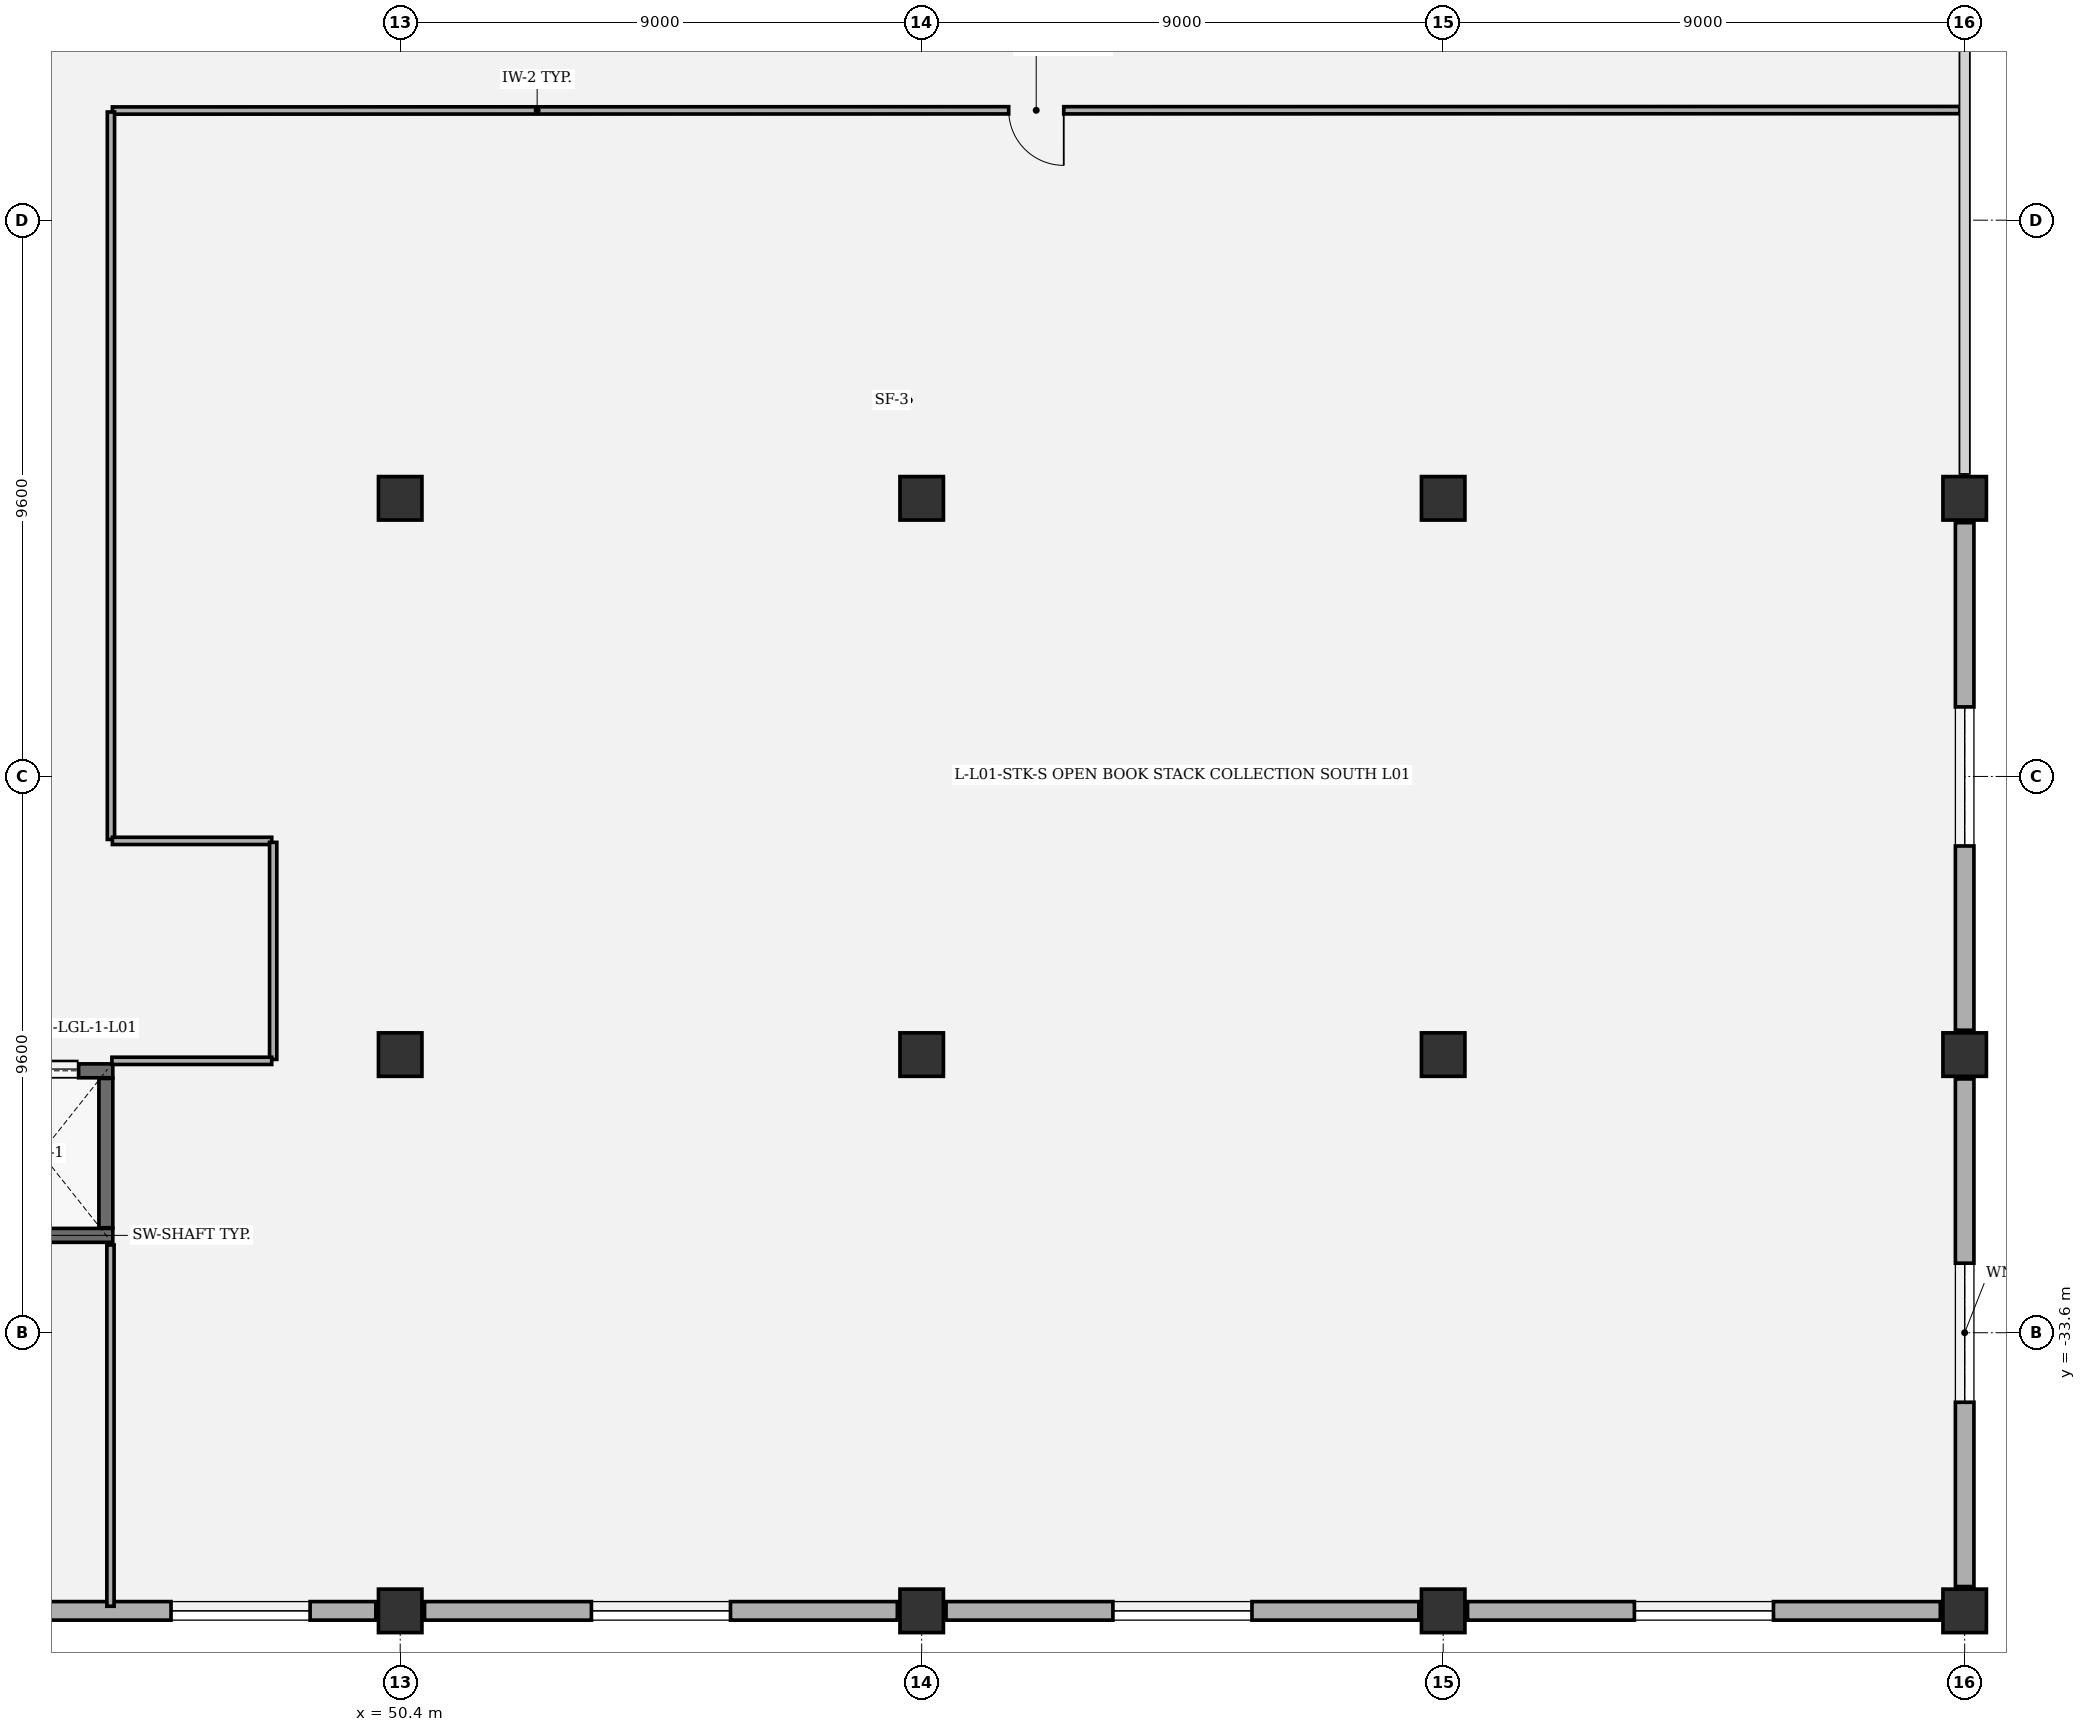
"""IFC4 building model, lengths in metres.
Left out: names, types, materials, properties, quantities, classifications, styles, units other than length and angle.
Written with IfcOpenShell. Run it as: python <this file> out.ifc"""

import sys

from ifc_helpers import new_model, si_unit, direction, frame, frame_2d, origin, origin_2d, place, context, subcontext, project, spatial, rectangle, extrude, element, fill, save


model = new_model("IFC4")
c1 = context("Model", 3, precision=1e-05, world=origin(), true_north=direction((0.0, 1.0)))
c2 = subcontext(c1, "Body", "Model", "MODEL_VIEW")
j1 = project(units=[si_unit("LENGTHUNIT", "METRE"), si_unit("PLANEANGLEUNIT", "RADIAN")], contexts=[c1])
p1 = place(None, origin())
s1 = spatial("IfcSite", under=j1, at=p1, CompositionType="ELEMENT")
p2 = place(p1, origin())
s2 = spatial("IfcBuilding", under=s1, at=p2, CompositionType="ELEMENT")
p3 = place(p2, frame((0.0, 0.0, 6.6)))
s3 = spatial("IfcBuildingStorey", under=s2, at=p3, CompositionType="ELEMENT", Elevation=6.6)
for number, where, z_axis, x_axis in (
    (1, (50.4, -38.4, 0.0), (0.0, 0.0, 1.0), (1.0, 0.0, 0.0)),
    (2, (50.4, -28.8, 0.0), (0.0, 0.0, 1.0), (1.0, 0.0, 0.0)),
    (3, (50.4, -19.2, 0.0), (0.0, 0.0, 1.0), (1.0, 0.0, 0.0)),
    (4, (59.4, -38.4, 0.0), (0.0, 0.0, 1.0), (1.0, 0.0, 0.0)),
    (5, (59.4, -28.8, 0.0), (0.0, 0.0, 1.0), (1.0, 0.0, 0.0)),
    (6, (59.4, -19.2, 0.0), (0.0, 0.0, 1.0), (1.0, 0.0, 0.0)),
    (7, (68.4, -38.4, 0.0), (0.0, 0.0, 1.0), (1.0, 0.0, 0.0)),
    (8, (68.4, -28.8, 0.0), (0.0, 0.0, 1.0), (1.0, 0.0, 0.0)),
    (9, (68.4, -19.2, 0.0), (0.0, 0.0, 1.0), (1.0, 0.0, 0.0)),
    (10, (77.4, -38.4, 0.0), (0.0, 0.0, 1.0), (1.0, 0.0, 0.0)),
    (11, (77.4, -28.8, 0.0), (0.0, 0.0, 1.0), (1.0, 0.0, 0.0)),
    (12, (77.4, -19.2, 0.0), (0.0, 0.0, 1.0), (1.0, 0.0, 0.0)),
):
    element("IfcColumn", number, at=place(p3, frame(where, z_axis=z_axis, x_axis=x_axis)), inside=s3, PredefinedType="COLUMN", context=c2, shape_type="SweptSolid", body=[
        extrude(rectangle(XDim=0.75, YDim=0.75, at=origin_2d()), origin(), (0.0, 0.0, 1.0), 5.4),
    ])
p4 = place(p3, frame((77.4, -29.22, 0.0), z_axis=(0.0, 0.0, 1.0), x_axis=(0.0, -1.0, 0.0)))
e13 = element("IfcWall", 13, at=p4, inside=s3, PredefinedType="SOLIDWALL", context=c2, shape_type="SweptSolid", body=[
    extrude(rectangle(XDim=8.76, YDim=0.32, at=frame_2d((4.38, 0.0))), origin(), (0.0, 0.0, 1.0), 4.337),
])
p5 = place(p4, frame((3.18, 0.0, 0.8)))
e14 = element("IfcOpeningElement", 14, at=p5, cuts=e13, PredefinedType="OPENING", context=c2, shape_type="SweptSolid", body=[
    extrude(rectangle(XDim=2.4, YDim=1.65, at=frame_2d((1.2, 0.825))), frame((0.0, 0.17, 0.0), z_axis=(0.0, -1.0, 0.0), x_axis=(1.0, 0.0, 0.0)), (0.0, 0.0, 1.0), 0.34),
])
p6 = place(p3, frame((77.4, -19.62, 0.0), z_axis=(0.0, 0.0, 1.0), x_axis=(0.0, -1.0, 0.0)))
e15 = element("IfcWall", 15, at=p6, inside=s3, PredefinedType="SOLIDWALL", context=c2, shape_type="SweptSolid", body=[
    extrude(rectangle(XDim=8.76, YDim=0.32, at=frame_2d((4.38, 0.0))), origin(), (0.0, 0.0, 1.0), 4.337),
])
p7 = place(p6, frame((3.18, 0.0, 0.8)))
e16 = element("IfcOpeningElement", 16, at=p7, cuts=e15, PredefinedType="OPENING", context=c2, shape_type="SweptSolid", body=[
    extrude(rectangle(XDim=2.4, YDim=1.65, at=frame_2d((1.2, 0.825))), frame((0.0, 0.17, 0.0), z_axis=(0.0, -1.0, 0.0), x_axis=(1.0, 0.0, 0.0)), (0.0, 0.0, 1.0), 0.34),
])
p8 = place(p3, frame((49.98, -38.4, 0.0), z_axis=(0.0, 0.0, 1.0), x_axis=(-1.0, 0.0, 0.0)))
e17 = element("IfcWall", 17, at=p8, inside=s3, PredefinedType="SOLIDWALL", context=c2, shape_type="SweptSolid", body=[
    extrude(rectangle(XDim=8.16, YDim=0.32, at=frame_2d((4.08, 0.0))), origin(), (0.0, 0.0, 1.0), 4.337),
])
p9 = place(p8, frame((1.135, 0.0, 0.8)))
e18 = element("IfcOpeningElement", 18, at=p9, cuts=e17, PredefinedType="OPENING", context=c2, shape_type="SweptSolid", body=[
    extrude(rectangle(XDim=2.4, YDim=1.65, at=frame_2d((1.2, 0.825))), frame((0.0, 0.17, 0.0), z_axis=(0.0, -1.0, 0.0), x_axis=(1.0, 0.0, 0.0)), (0.0, 0.0, 1.0), 0.34),
])
p10 = place(p3, frame((58.98, -38.4, 0.0), z_axis=(0.0, 0.0, 1.0), x_axis=(-1.0, 0.0, 0.0)))
e19 = element("IfcWall", 19, at=p10, inside=s3, PredefinedType="SOLIDWALL", context=c2, shape_type="SweptSolid", body=[
    extrude(rectangle(XDim=8.16, YDim=0.32, at=frame_2d((4.08, 0.0))), origin(), (0.0, 0.0, 1.0), 4.337),
])
p11 = place(p10, frame((2.88, 0.0, 0.8)))
e20 = element("IfcOpeningElement", 20, at=p11, cuts=e19, PredefinedType="OPENING", context=c2, shape_type="SweptSolid", body=[
    extrude(rectangle(XDim=2.4, YDim=1.65, at=frame_2d((1.2, 0.825))), frame((0.0, 0.17, 0.0), z_axis=(0.0, -1.0, 0.0), x_axis=(1.0, 0.0, 0.0)), (0.0, 0.0, 1.0), 0.34),
])
p12 = place(p3, frame((67.98, -38.4, 0.0), z_axis=(0.0, 0.0, 1.0), x_axis=(-1.0, 0.0, 0.0)))
e21 = element("IfcWall", 21, at=p12, inside=s3, PredefinedType="SOLIDWALL", context=c2, shape_type="SweptSolid", body=[
    extrude(rectangle(XDim=8.16, YDim=0.32, at=frame_2d((4.08, 0.0))), origin(), (0.0, 0.0, 1.0), 4.337),
])
p13 = place(p12, frame((2.88, 0.0, 0.8)))
e22 = element("IfcOpeningElement", 22, at=p13, cuts=e21, PredefinedType="OPENING", context=c2, shape_type="SweptSolid", body=[
    extrude(rectangle(XDim=2.4, YDim=1.65, at=frame_2d((1.2, 0.825))), frame((0.0, 0.17, 0.0), z_axis=(0.0, -1.0, 0.0), x_axis=(1.0, 0.0, 0.0)), (0.0, 0.0, 1.0), 0.34),
])
p14 = place(p3, frame((76.98, -38.4, 0.0), z_axis=(0.0, 0.0, 1.0), x_axis=(-1.0, 0.0, 0.0)))
e23 = element("IfcWall", 23, at=p14, inside=s3, PredefinedType="SOLIDWALL", context=c2, shape_type="SweptSolid", body=[
    extrude(rectangle(XDim=8.16, YDim=0.32, at=frame_2d((4.08, 0.0))), origin(), (0.0, 0.0, 1.0), 4.337),
])
p15 = place(p14, frame((2.88, 0.0, 0.8)))
e24 = element("IfcOpeningElement", 24, at=p15, cuts=e23, PredefinedType="OPENING", context=c2, shape_type="SweptSolid", body=[
    extrude(rectangle(XDim=2.4, YDim=1.65, at=frame_2d((1.2, 0.825))), frame((0.0, 0.17, 0.0), z_axis=(0.0, -1.0, 0.0), x_axis=(1.0, 0.0, 0.0)), (0.0, 0.0, 1.0), 0.34),
])
p16 = place(p3, frame((45.44, -31.92, 0.0), z_axis=(0.0, 0.0, 1.0), x_axis=(-1.0, 0.0, 0.0)))
e25 = element("IfcWall", 25, at=p16, inside=s3, PredefinedType="SHEAR", context=c2, shape_type="SweptSolid", body=[
    extrude(rectangle(XDim=2.48, YDim=0.24, at=frame_2d((1.24, 0.0))), origin(), (0.0, 0.0, 1.0), 5.14),
])
p17 = place(p3, frame((42.96, -29.08, 0.0), z_axis=(0.0, 0.0, 1.0), x_axis=(1.0, 0.0, 0.0)))
e26 = element("IfcWall", 26, at=p17, inside=s3, PredefinedType="SHEAR", context=c2, shape_type="SweptSolid", body=[
    extrude(rectangle(XDim=2.48, YDim=0.24, at=frame_2d((1.24, 0.0))), origin(), (0.0, 0.0, 1.0), 5.14),
])
p18 = place(p17, frame((0.59, 0.0, 0.0)))
e27 = element("IfcOpeningElement", 27, at=p18, cuts=e26, PredefinedType="OPENING", context=c2, shape_type="SweptSolid", body=[
    extrude(rectangle(XDim=1.3, YDim=2.3, at=frame_2d((0.65, 1.15))), frame((0.0, 0.13, 0.0), z_axis=(0.0, -1.0, 0.0), x_axis=(1.0, 0.0, 0.0)), (0.0, 0.0, 1.0), 0.26),
])
p19 = place(p3, frame((45.32, -29.212, 0.0), z_axis=(0.0, 0.0, 1.0), x_axis=(0.0, -1.0, 0.0)))
e28 = element("IfcWall", 28, at=p19, inside=s3, PredefinedType="SHEAR", context=c2, shape_type="SweptSolid", body=[
    extrude(rectangle(XDim=2.576, YDim=0.24, at=frame_2d((1.288, 0.0))), origin(), (0.0, 0.0, 1.0), 5.14),
])
p20 = place(p3, frame((77.32, -12.5, 0.0), z_axis=(0.0, 0.0, 1.0), x_axis=(-0.999999968081, -0.000252662519, 0.0)))
e29 = element("IfcWall", 29, at=p20, inside=s3, PredefinedType="PARTITIONING", context=c2, shape_type="SweptSolid", body=[
    extrude(rectangle(XDim=31.887, YDim=0.125, at=frame_2d((15.943, 0.0))), origin(), (0.0, 0.0, 1.0), 5.14),
])
p21 = place(p20, frame((15.469, 0.0, 0.0)))
e30 = element("IfcOpeningElement", 30, at=p21, cuts=e29, PredefinedType="OPENING", context=c2, shape_type="SweptSolid", body=[
    extrude(rectangle(XDim=0.95, YDim=2.15, at=frame_2d((0.475, 1.075))), frame((0.0, 0.073, 0.0), z_axis=(0.0, -1.0, 0.0), x_axis=(1.0, 0.0, 0.0)), (0.0, 0.0, 1.0), 0.145),
])
p22 = place(p3, frame((45.408, -12.533, 0.0), z_axis=(0.0, 0.0, 1.0), x_axis=(0.0, -1.0, 0.0)))
e31 = element("IfcWall", 31, at=p22, inside=s3, PredefinedType="PARTITIONING", context=c2, shape_type="SweptSolid", body=[
    extrude(rectangle(XDim=12.554, YDim=0.125, at=frame_2d((6.277, 0.0))), origin(), (0.0, 0.0, 1.0), 5.14),
])
p23 = place(p3, frame((48.183, -25.112, 0.0), z_axis=(0.0, 0.0, 1.0), x_axis=(-1.0, 0.0, 0.0)))
e32 = element("IfcWall", 32, at=p23, inside=s3, PredefinedType="PARTITIONING", context=c2, shape_type="SweptSolid", body=[
    extrude(rectangle(XDim=2.75, YDim=0.125, at=frame_2d((1.375, 0.0))), origin(), (0.0, 0.0, 1.0), 5.14),
])
p24 = place(p3, frame((48.208, -25.137, 0.0), z_axis=(0.0, 0.0, 1.0), x_axis=(0.0, -1.0, 0.0)))
e33 = element("IfcWall", 33, at=p24, inside=s3, PredefinedType="PARTITIONING", context=c2, shape_type="SweptSolid", body=[
    extrude(rectangle(XDim=3.746, YDim=0.125, at=frame_2d((1.873, 0.0))), origin(), (0.0, 0.0, 1.0), 5.14),
])
p25 = place(p3, frame((45.425, -28.908, 0.0), z_axis=(0.0, 0.0, 1.0), x_axis=(1.0, 0.0, 0.0)))
e34 = element("IfcWall", 34, at=p25, inside=s3, PredefinedType="PARTITIONING", context=c2, shape_type="SweptSolid", body=[
    extrude(rectangle(XDim=2.758, YDim=0.125, at=frame_2d((1.379, 0.0))), origin(), (0.0, 0.0, 1.0), 4.414),
])
p26 = place(p3, frame((45.4, -32.085, 0.0), z_axis=(0.0, 0.0, 1.0), x_axis=(0.0, -1.0, 0.0)))
e35 = element("IfcWall", 35, at=p26, inside=s3, PredefinedType="PARTITIONING", context=c2, shape_type="SweptSolid", body=[
    extrude(rectangle(XDim=6.235, YDim=0.125, at=frame_2d((3.118, 0.0))), origin(), (0.0, 0.0, 1.0), 5.14),
])
p27 = place(p5, origin())
e36 = element("IfcWindow", 36, at=p27, inside=s3, PartitioningType="SINGLE_PANEL", PredefinedType="WINDOW", context=c2, shape_type="SweptSolid", body=[
    extrude(rectangle(XDim=2.4, YDim=1.65, at=frame_2d((1.2, 0.825))), frame((0.0, 0.03, 0.0), z_axis=(0.0, -1.0, 0.0), x_axis=(1.0, 0.0, 0.0)), (0.0, 0.0, 1.0), 0.06),
])
fill(e14, e36)
p28 = place(p7, origin())
e37 = element("IfcWindow", 37, at=p28, inside=s3, PartitioningType="SINGLE_PANEL", PredefinedType="WINDOW", context=c2, shape_type="SweptSolid", body=[
    extrude(rectangle(XDim=2.4, YDim=1.65, at=frame_2d((1.2, 0.825))), frame((0.0, 0.03, 0.0), z_axis=(0.0, -1.0, 0.0), x_axis=(1.0, 0.0, 0.0)), (0.0, 0.0, 1.0), 0.06),
])
fill(e16, e37)
p29 = place(p9, origin())
e38 = element("IfcWindow", 38, at=p29, inside=s3, PartitioningType="SINGLE_PANEL", PredefinedType="WINDOW", context=c2, shape_type="SweptSolid", body=[
    extrude(rectangle(XDim=2.4, YDim=1.65, at=frame_2d((1.2, 0.825))), frame((0.0, 0.03, 0.0), z_axis=(0.0, -1.0, 0.0), x_axis=(1.0, 0.0, 0.0)), (0.0, 0.0, 1.0), 0.06),
])
fill(e18, e38)
p30 = place(p11, origin())
e39 = element("IfcWindow", 39, at=p30, inside=s3, PartitioningType="SINGLE_PANEL", PredefinedType="WINDOW", context=c2, shape_type="SweptSolid", body=[
    extrude(rectangle(XDim=2.4, YDim=1.65, at=frame_2d((1.2, 0.825))), frame((0.0, 0.03, 0.0), z_axis=(0.0, -1.0, 0.0), x_axis=(1.0, 0.0, 0.0)), (0.0, 0.0, 1.0), 0.06),
])
fill(e20, e39)
p31 = place(p13, origin())
e40 = element("IfcWindow", 40, at=p31, inside=s3, PartitioningType="SINGLE_PANEL", PredefinedType="WINDOW", context=c2, shape_type="SweptSolid", body=[
    extrude(rectangle(XDim=2.4, YDim=1.65, at=frame_2d((1.2, 0.825))), frame((0.0, 0.03, 0.0), z_axis=(0.0, -1.0, 0.0), x_axis=(1.0, 0.0, 0.0)), (0.0, 0.0, 1.0), 0.06),
])
fill(e22, e40)
p32 = place(p15, origin())
e41 = element("IfcWindow", 41, at=p32, inside=s3, PartitioningType="SINGLE_PANEL", PredefinedType="WINDOW", context=c2, shape_type="SweptSolid", body=[
    extrude(rectangle(XDim=2.4, YDim=1.65, at=frame_2d((1.2, 0.825))), frame((0.0, 0.03, 0.0), z_axis=(0.0, -1.0, 0.0), x_axis=(1.0, 0.0, 0.0)), (0.0, 0.0, 1.0), 0.06),
])
fill(e24, e41)
p33 = place(p18, origin())
e42 = element("IfcDoor", 42, at=p33, inside=s3, OperationType="DOUBLE_DOOR_SLIDING", PredefinedType="DOOR", context=c2, shape_type="SweptSolid", body=[
    extrude(rectangle(XDim=1.3, YDim=2.3, at=frame_2d((0.65, 1.15))), frame((0.0, 0.025, 0.0), z_axis=(0.0, -1.0, 0.0), x_axis=(1.0, 0.0, 0.0)), (0.0, 0.0, 1.0), 0.05),
])
fill(e27, e42)
p34 = place(p21, origin())
e43 = element("IfcDoor", 43, at=p34, inside=s3, OperationType="SINGLE_SWING_LEFT", PredefinedType="DOOR", context=c2, shape_type="SweptSolid", body=[
    extrude(rectangle(XDim=0.95, YDim=2.15, at=frame_2d((0.475, 1.075))), frame((0.0, 0.025, 0.0), z_axis=(0.0, -1.0, 0.0), x_axis=(1.0, 0.0, 0.0)), (0.0, 0.0, 1.0), 0.05),
])
fill(e30, e43)
save(model, sys.argv[1])
